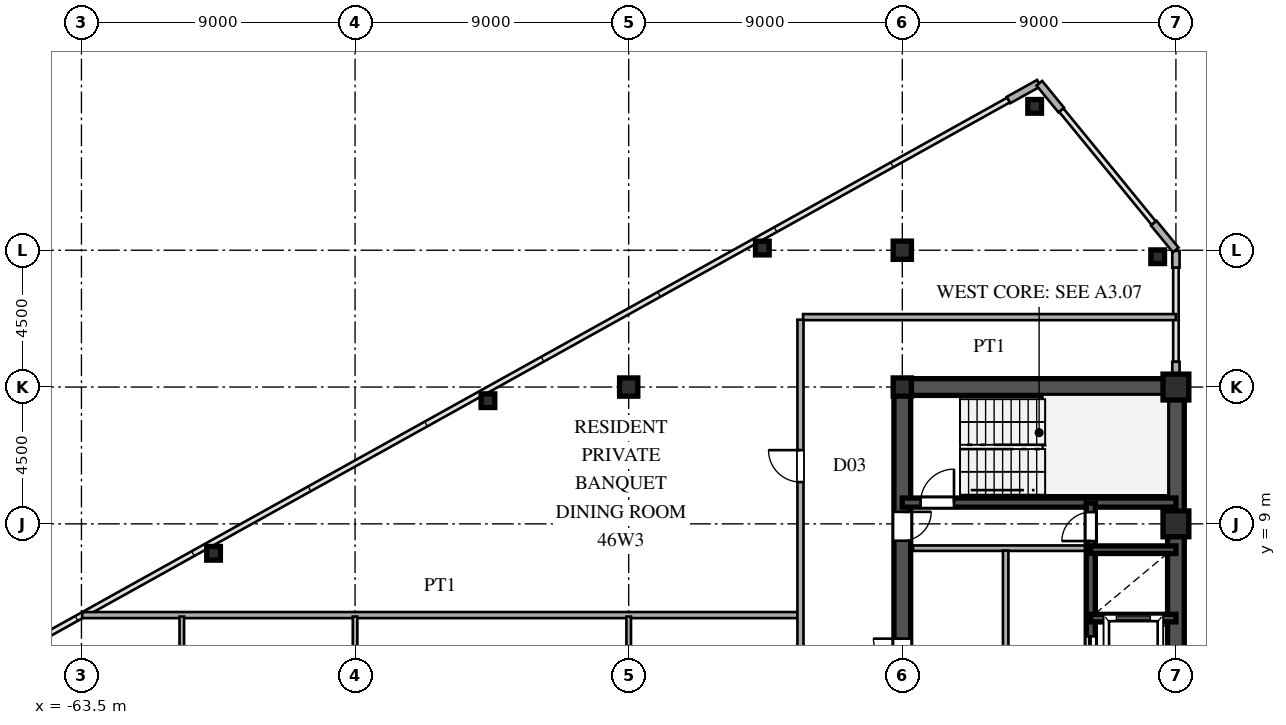
"""IFC4 building model, lengths in metres.
Left out: names, types, materials, properties, quantities, classifications, styles, units other than length and angle.
Written with IfcOpenShell. Run it as: python <this file> out.ifc"""

import sys

from ifc_helpers import new_model, si_unit, direction, frame, frame_2d, origin, origin_2d, place, context, subcontext, project, spatial, rectangle, hollow_rectangle, i_section, extrude, source, transform, mapped, element, fill, save


model = new_model("IFC4")
c1 = context("Model", 3, precision=1e-05, world=origin(), true_north=direction((0.0, 1.0)))
c2 = subcontext(c1, "Body", "Model", "MODEL_VIEW")
j1 = project(units=[si_unit("LENGTHUNIT", "METRE"), si_unit("PLANEANGLEUNIT", "RADIAN")], contexts=[c1])
p1 = place(None, origin())
s1 = spatial("IfcSite", under=j1, at=p1, CompositionType="ELEMENT")
p2 = place(p1, origin())
s2 = spatial("IfcBuilding", under=s1, at=p2, CompositionType="ELEMENT")
p3 = place(p2, frame((0.0, 0.0, 174.3)))
s3 = spatial("IfcBuildingStorey", under=s2, at=p3, CompositionType="ELEMENT", Elevation=174.3)
m1 = source(origin(), c2, "Body", "SweptSolid", [
    extrude(hollow_rectangle(XDim=0.85, YDim=0.85, WallThickness=0.036, at=origin_2d()), origin(), (0.0, 0.0, 1.0), 3.6),
])
for number, where, z_axis, x_axis in (
    (1, (-27.5, 9.0, 0.0), (0.0, 0.0, 1.0), (1.0, 0.0, 0.0)),
    (2, (-27.5, 13.5, 0.0), (0.0, 0.0, 1.0), (1.0, 0.0, 0.0)),
):
    element("IfcColumn", number, at=place(p3, frame(where, z_axis=z_axis, x_axis=x_axis)), inside=s3, PredefinedType="COLUMN", context=c2, shape_type="MappedRepresentation", body=[
        mapped(m1, transform((0.0, 0.0, 0.0), scale=1.0)),
    ])
m2 = source(origin(), c2, "Body", "SweptSolid", [
    extrude(i_section(OverallWidth=0.6, OverallDepth=0.6, WebThickness=0.025, FlangeThickness=0.04, at=origin_2d()), origin(), (0.0, 0.0, 1.0), 3.6),
])
for number, where, z_axis, x_axis in (
    (3, (-36.5, 13.5, 0.0), (0.0, 0.0, 1.0), (1.0, 0.0, 0.0)),
    (4, (-36.5, 18.0, 0.0), (0.0, 0.0, 1.0), (1.0, 0.0, 0.0)),
    (5, (-45.5, 13.5, 0.0), (0.0, 0.0, 1.0), (1.0, 0.0, 0.0)),
):
    element("IfcColumn", number, at=place(p3, frame(where, z_axis=z_axis, x_axis=x_axis)), inside=s3, PredefinedType="COLUMN", context=c2, shape_type="MappedRepresentation", body=[
        mapped(m2, transform((0.0, 0.0, 0.0), scale=1.0)),
    ])
m3 = source(origin(), c2, "Body", "SweptSolid", [
    extrude(hollow_rectangle(XDim=0.45, YDim=0.45, WallThickness=0.018, at=origin_2d()), origin(), (0.0, 0.0, 1.0), 3.6),
])
for number, where, z_axis, x_axis in (
    (6, (-28.1, 17.786, 0.0), (0.0, 0.0, 1.0), (1.0, 0.0, 0.0)),
    (7, (-32.147, 22.732, 0.0), (0.0, 0.0, 1.0), (1.0, 0.0, 0.0)),
    (8, (-41.104, 18.071, 0.0), (0.0, 0.0, 1.0), (1.0, 0.0, 0.0)),
    (9, (-50.129, 13.051, 0.0), (0.0, 0.0, 1.0), (1.0, 0.0, 0.0)),
    (10, (-59.155, 8.031, 0.0), (0.0, 0.0, 1.0), (1.0, 0.0, 0.0)),
):
    element("IfcColumn", number, at=place(p3, frame(where, z_axis=z_axis, x_axis=x_axis)), inside=s3, PredefinedType="COLUMN", context=c2, shape_type="MappedRepresentation", body=[
        mapped(m3, transform((0.0, 0.0, 0.0), scale=1.0)),
    ])
p4 = place(p3, frame((-27.5, 13.78, 0.0), z_axis=(0.0, 0.0, 1.0), x_axis=(0.0, 1.0, 0.0)))
e11 = element("IfcWall", 11, at=p4, inside=s3, PredefinedType="SOLIDWALL", context=c2, shape_type="SweptSolid", body=[
    extrude(rectangle(XDim=0.55, YDim=0.24, at=frame_2d((0.275, 0.0))), origin(), (0.0, 0.0, 1.0), 2.88),
])
p5 = place(p3, frame((-27.5, 17.43, 0.0), z_axis=(0.0, 0.0, 1.0), x_axis=(0.0, 1.0, 0.0)))
e12 = element("IfcWall", 12, at=p5, inside=s3, PredefinedType="SOLIDWALL", context=c2, shape_type="SweptSolid", body=[
    extrude(rectangle(XDim=0.55, YDim=0.24, at=frame_2d((0.275, 0.0))), origin(), (0.0, 0.0, 1.0), 3.38),
])
for number, where, z_axis, x_axis in (
    (13, (-27.506, 18.008, 0.0), (0.0, 0.0, 1.0), (-0.633, 0.774, 0.0)),
    (14, (-31.272, 22.61, 0.0), (0.0, 0.0, 1.0), (-0.633, 0.774, 0.0)),
):
    element("IfcWall", number, at=place(p3, frame(where, z_axis=z_axis, x_axis=x_axis)), inside=s3, PredefinedType="SOLIDWALL", context=c2, shape_type="SweptSolid", body=[
        extrude(rectangle(XDim=1.14, YDim=0.24, at=frame_2d((0.57, 0.0))), origin(), (0.0, 0.0, 1.0), 3.38),
    ])
p6 = place(p3, frame((-32.009, 23.495, 0.0), z_axis=(0.0, 0.0, 1.0), x_axis=(-0.87385402111, -0.486188389196, 0.0)))
e15 = element("IfcWall", 15, at=p6, inside=s3, PredefinedType="SOLIDWALL", context=c2, shape_type="SweptSolid", body=[
    extrude(rectangle(XDim=1.14, YDim=0.24, at=frame_2d((0.57, 0.0))), origin(), (0.0, 0.0, 1.0), 3.38),
])
p7 = place(p3, frame((-27.5, 1.3, 0.0), z_axis=(0.0, 0.0, 1.0), x_axis=(0.0, 1.0, 0.0)))
e16 = element("IfcWall", 16, at=p7, inside=s3, PredefinedType="SHEAR", context=c2, shape_type="SweptSolid", body=[
    extrude(rectangle(XDim=12.2, YDim=0.55, at=frame_2d((6.1, 0.0))), origin(), (0.0, 0.0, 1.0), 3.38),
])
p8 = place(p3, frame((-36.5, 13.5, 0.0), z_axis=(0.0, 0.0, 1.0), x_axis=(1.0, 0.0, 0.0)))
e17 = element("IfcWall", 17, at=p8, inside=s3, PredefinedType="SHEAR", context=c2, shape_type="SweptSolid", body=[
    extrude(rectangle(XDim=9.0, YDim=0.55, at=frame_2d((4.5, 0.0))), origin(), (0.0, 0.0, 1.0), 3.38),
])
p9 = place(p3, frame((-36.5, 8.2, 0.0), z_axis=(0.0, 0.0, 1.0), x_axis=(0.0, 1.0, 0.0)))
e18 = element("IfcWall", 18, at=p9, inside=s3, PredefinedType="SHEAR", context=c2, shape_type="SweptSolid", body=[
    extrude(rectangle(XDim=5.45, YDim=0.55, at=frame_2d((2.725, 0.0))), origin(), (0.0, 0.0, 1.0), 3.38),
])
p10 = place(p9, frame((0.245, 0.0, 0.0)))
e19 = element("IfcOpeningElement", 19, at=p10, cuts=e18, PredefinedType="OPENING", context=c2, shape_type="SweptSolid", body=[
    extrude(rectangle(XDim=0.95, YDim=2.15, at=frame_2d((0.475, 1.075))), frame((0.0, 0.285, 0.0), z_axis=(0.0, -1.0, 0.0), x_axis=(1.0, 0.0, 0.0)), (0.0, 0.0, 1.0), 0.57),
])
p11 = place(p3, frame((-36.5, 1.3, 0.0), z_axis=(0.0, 0.0, 1.0), x_axis=(0.0, 1.0, 0.0)))
e20 = element("IfcWall", 20, at=p11, inside=s3, PredefinedType="SHEAR", context=c2, shape_type="SweptSolid", body=[
    extrude(rectangle(XDim=6.9, YDim=0.55, at=frame_2d((3.45, 0.0))), origin(), (0.0, 0.0, 1.0), 3.38),
])
p12 = place(p11, frame((2.975, 0.0, 0.0)))
e21 = element("IfcOpeningElement", 21, at=p12, cuts=e20, PredefinedType="OPENING", context=c2, shape_type="SweptSolid", body=[
    extrude(rectangle(XDim=0.95, YDim=2.15, at=frame_2d((0.475, 1.075))), frame((0.0, 0.285, 0.0), z_axis=(0.0, -1.0, 0.0), x_axis=(1.0, 0.0, 0.0)), (0.0, 0.0, 1.0), 0.57),
])
p13 = place(p3, frame((-36.5, 9.7, 0.0), z_axis=(0.0, 0.0, 1.0), x_axis=(1.0, 0.0, 0.0)))
e22 = element("IfcWall", 22, at=p13, inside=s3, PredefinedType="SHEAR", context=c2, shape_type="SweptSolid", body=[
    extrude(rectangle(XDim=9.0, YDim=0.3, at=frame_2d((4.5, 0.0))), origin(), (0.0, 0.0, 1.0), 3.38),
])
p14 = place(p13, frame((0.6, 0.0, 0.0)))
e23 = element("IfcOpeningElement", 23, at=p14, cuts=e22, PredefinedType="OPENING", context=c2, shape_type="SweptSolid", body=[
    extrude(rectangle(XDim=1.1, YDim=2.2, at=frame_2d((0.55, 1.1))), frame((0.0, 0.16, 0.0), z_axis=(0.0, -1.0, 0.0), x_axis=(1.0, 0.0, 0.0)), (0.0, 0.0, 1.0), 0.32),
])
for number, where, z_axis, x_axis in (
    (24, (-30.3, 5.9, 0.0), (0.0, 0.0, 1.0), (1.0, 0.0, 0.0)),
    (25, (-30.3, 8.15, 0.0), (0.0, 0.0, 1.0), (1.0, 0.0, 0.0)),
):
    element("IfcWall", number, at=place(p3, frame(where, z_axis=z_axis, x_axis=x_axis)), inside=s3, PredefinedType="SHEAR", context=c2, shape_type="SweptSolid", body=[
        extrude(rectangle(XDim=2.8, YDim=0.25, at=frame_2d((1.4, 0.0))), origin(), (0.0, 0.0, 1.0), 3.38),
    ])
p15 = place(p3, frame((-30.3, 3.6, 0.0), z_axis=(0.0, 0.0, 1.0), x_axis=(0.0, 1.0, 0.0)))
e26 = element("IfcWall", 26, at=p15, inside=s3, PredefinedType="SHEAR", context=c2, shape_type="SweptSolid", body=[
    extrude(rectangle(XDim=2.3, YDim=0.3, at=frame_2d((1.15, 0.0))), origin(), (0.0, 0.0, 1.0), 3.38),
])
p16 = place(p15, frame((0.6, 0.0, 0.0)))
e27 = element("IfcOpeningElement", 27, at=p16, cuts=e26, PredefinedType="OPENING", context=c2, shape_type="SweptSolid", body=[
    extrude(rectangle(XDim=1.1, YDim=2.2, at=frame_2d((0.55, 1.1))), frame((0.0, 0.16, 0.0), z_axis=(0.0, -1.0, 0.0), x_axis=(1.0, 0.0, 0.0)), (0.0, 0.0, 1.0), 0.32),
])
p17 = place(p3, frame((-30.3, 5.9, 0.0), z_axis=(0.0, 0.0, 1.0), x_axis=(0.0, 1.0, 0.0)))
e28 = element("IfcWall", 28, at=p17, inside=s3, PredefinedType="SHEAR", context=c2, shape_type="SweptSolid", body=[
    extrude(rectangle(XDim=2.25, YDim=0.3, at=frame_2d((1.125, 0.0))), origin(), (0.0, 0.0, 1.0), 3.38),
])
p18 = place(p3, frame((-30.3, 8.15, 0.0), z_axis=(0.0, 0.0, 1.0), x_axis=(0.0, 1.0, 0.0)))
e29 = element("IfcWall", 29, at=p18, inside=s3, PredefinedType="SHEAR", context=c2, shape_type="SweptSolid", body=[
    extrude(rectangle(XDim=1.53, YDim=0.3, at=frame_2d((0.765, 0.0))), origin(), (0.0, 0.0, 1.0), 3.38),
])
p19 = place(p18, frame((0.285, 0.0, 0.0)))
e30 = element("IfcOpeningElement", 30, at=p19, cuts=e29, PredefinedType="OPENING", context=c2, shape_type="SweptSolid", body=[
    extrude(rectangle(XDim=0.95, YDim=2.15, at=frame_2d((0.475, 1.075))), frame((0.0, 0.16, 0.0), z_axis=(0.0, -1.0, 0.0), x_axis=(1.0, 0.0, 0.0)), (0.0, 0.0, 1.0), 0.32),
])
p20 = place(p3, frame((-36.15, 8.2, 0.0), z_axis=(0.0, 0.0, 1.0), x_axis=(1.0, 0.0, 0.0)))
e31 = element("IfcWall", 31, at=p20, inside=s3, PredefinedType="PARTITIONING", context=c2, shape_type="SweptSolid", body=[
    extrude(rectangle(XDim=5.7, YDim=0.18, at=frame_2d((2.85, 0.0))), origin(), (0.0, 0.0, 1.0), 3.38),
])
p21 = place(p3, frame((-33.1, 1.38, 0.0), z_axis=(0.0, 0.0, 1.0), x_axis=(0.0, 1.0, 0.0)))
e32 = element("IfcWall", 32, at=p21, inside=s3, PredefinedType="PARTITIONING", context=c2, shape_type="SweptSolid", body=[
    extrude(rectangle(XDim=6.74, YDim=0.18, at=frame_2d((3.37, 0.0))), origin(), (0.0, 0.0, 1.0), 3.38),
])
p22 = place(p3, frame((-63.476, 6.0, 0.0), z_axis=(0.0, 0.0, 1.0), x_axis=(1.0, 0.0, 0.0)))
e33 = element("IfcWall", 33, at=p22, inside=s3, PredefinedType="PARTITIONING", context=c2, shape_type="SweptSolid", body=[
    extrude(rectangle(XDim=23.546, YDim=0.2, at=frame_2d((11.773, 0.0))), origin(), (0.0, 0.0, 1.0), 3.38),
])
p23 = place(p3, frame((-39.765, 15.8, 0.0), z_axis=(0.0, 0.0, 1.0), x_axis=(1.0, 0.0, 0.0)))
e34 = element("IfcWall", 34, at=p23, inside=s3, PredefinedType="PARTITIONING", context=c2, shape_type="SweptSolid", body=[
    extrude(rectangle(XDim=12.265, YDim=0.2, at=frame_2d((6.132, 0.0))), origin(), (0.0, 0.0, 1.0), 3.38),
])
p24 = place(p3, frame((-60.2, -3.283, 0.0), z_axis=(0.0, 0.0, 1.0), x_axis=(0.0, 1.0, 0.0)))
e35 = element("IfcWall", 35, at=p24, inside=s3, PredefinedType="PARTITIONING", context=c2, shape_type="SweptSolid", body=[
    extrude(rectangle(XDim=9.233, YDim=0.15, at=frame_2d((4.616, 0.0))), origin(), (0.0, 0.0, 1.0), 3.38),
])
p25 = place(p24, frame((1.808, 0.0, 0.0)))
e36 = element("IfcOpeningElement", 36, at=p25, cuts=e35, PredefinedType="OPENING", context=c2, shape_type="SweptSolid", body=[
    extrude(rectangle(XDim=0.95, YDim=2.15, at=frame_2d((0.475, 1.075))), frame((0.0, 0.085, 0.0), z_axis=(0.0, -1.0, 0.0), x_axis=(1.0, 0.0, 0.0)), (0.0, 0.0, 1.0), 0.17),
])
p26 = place(p24, frame((6.475, 0.0, 0.0)))
e37 = element("IfcOpeningElement", 37, at=p26, cuts=e35, PredefinedType="OPENING", context=c2, shape_type="SweptSolid", body=[
    extrude(rectangle(XDim=0.95, YDim=2.15, at=frame_2d((0.475, 1.075))), frame((0.0, 0.085, 0.0), z_axis=(0.0, -1.0, 0.0), x_axis=(1.0, 0.0, 0.0)), (0.0, 0.0, 1.0), 0.17),
])
p27 = place(p3, frame((-54.5, -7.95, 0.0), z_axis=(0.0, 0.0, 1.0), x_axis=(0.0, 1.0, 0.0)))
e38 = element("IfcWall", 38, at=p27, inside=s3, PredefinedType="PARTITIONING", context=c2, shape_type="SweptSolid", body=[
    extrude(rectangle(XDim=13.9, YDim=0.15, at=frame_2d((6.95, 0.0))), origin(), (0.0, 0.0, 1.0), 2.78),
])
p28 = place(p27, frame((6.475, 0.0, 0.0)))
e39 = element("IfcOpeningElement", 39, at=p28, cuts=e38, PredefinedType="OPENING", context=c2, shape_type="SweptSolid", body=[
    extrude(rectangle(XDim=0.95, YDim=2.15, at=frame_2d((0.475, 1.075))), frame((0.0, 0.085, 0.0), z_axis=(0.0, -1.0, 0.0), x_axis=(1.0, 0.0, 0.0)), (0.0, 0.0, 1.0), 0.17),
])
p29 = place(p3, frame((-45.5, 1.852, 0.0), z_axis=(0.0, 0.0, 1.0), x_axis=(0.0, 1.0, 0.0)))
e40 = element("IfcWall", 40, at=p29, inside=s3, PredefinedType="PARTITIONING", context=c2, shape_type="SweptSolid", body=[
    extrude(rectangle(XDim=4.098, YDim=0.15, at=frame_2d((2.049, 0.0))), origin(), (0.0, 0.0, 1.0), 2.78),
])
p30 = place(p3, frame((-39.85, -15.715, 0.0), z_axis=(0.0, 0.0, 1.0), x_axis=(0.0, 1.0, 0.0)))
e41 = element("IfcWall", 41, at=p30, inside=s3, PredefinedType="PARTITIONING", context=c2, shape_type="SweptSolid", body=[
    extrude(rectangle(XDim=31.43, YDim=0.2, at=frame_2d((15.715, 0.0))), origin(), (0.0, 0.0, 1.0), 3.38),
])
p31 = place(p30, frame((3.29, 0.0, 0.0)))
e42 = element("IfcOpeningElement", 42, at=p31, cuts=e41, PredefinedType="OPENING", context=c2, shape_type="SweptSolid", body=[
    extrude(rectangle(XDim=1.05, YDim=2.25, at=frame_2d((0.525, 1.125))), frame((0.0, 0.11, 0.0), z_axis=(0.0, -1.0, 0.0), x_axis=(1.0, 0.0, 0.0)), (0.0, 0.0, 1.0), 0.22),
])
p32 = place(p30, frame((13.98, 0.0, 0.0)))
e43 = element("IfcOpeningElement", 43, at=p32, cuts=e41, PredefinedType="OPENING", context=c2, shape_type="SweptSolid", body=[
    extrude(rectangle(XDim=1.05, YDim=2.25, at=frame_2d((0.525, 1.125))), frame((0.0, 0.11, 0.0), z_axis=(0.0, -1.0, 0.0), x_axis=(1.0, 0.0, 0.0)), (0.0, 0.0, 1.0), 0.22),
])
p33 = place(p30, frame((26.09, 0.0, 0.0)))
e44 = element("IfcOpeningElement", 44, at=p33, cuts=e41, PredefinedType="OPENING", context=c2, shape_type="SweptSolid", body=[
    extrude(rectangle(XDim=1.05, YDim=2.25, at=frame_2d((0.525, 1.125))), frame((0.0, 0.11, 0.0), z_axis=(0.0, -1.0, 0.0), x_axis=(1.0, 0.0, 0.0)), (0.0, 0.0, 1.0), 0.22),
])
m4 = source(origin(), c2, "Body", "SweptSolid", [
    extrude(rectangle(XDim=0.95, YDim=2.15, at=frame_2d((0.475, 1.075))), frame((0.0, 0.025, 0.0), z_axis=(0.0, -1.0, 0.0), x_axis=(1.0, 0.0, 0.0)), (0.0, 0.0, 1.0), 0.05),
])
p34 = place(p10, frame((0.95, 0.0, 0.0), z_axis=(0.0, 0.0, 1.0), x_axis=(-1.0, 0.0, 0.0)))
e45 = element("IfcDoor", 45, at=p34, inside=s3, OperationType="SINGLE_SWING_RIGHT", PredefinedType="DOOR", context=c2, shape_type="MappedRepresentation", body=[
    mapped(m4, transform((0.0, 0.0, 0.0), scale=1.0)),
])
fill(e19, e45)
p35 = place(p12, origin())
e46 = element("IfcDoor", 46, at=p35, inside=s3, OperationType="SINGLE_SWING_RIGHT", PredefinedType="DOOR", context=c2, shape_type="MappedRepresentation", body=[
    mapped(m4, transform((0.0, 0.0, 0.0), scale=1.0)),
])
fill(e21, e46)
m5 = source(origin(), c2, "Body", "SweptSolid", [
    extrude(rectangle(XDim=1.1, YDim=2.2, at=frame_2d((0.55, 1.1))), frame((0.0, 0.025, 0.0), z_axis=(0.0, -1.0, 0.0), x_axis=(1.0, 0.0, 0.0)), (0.0, 0.0, 1.0), 0.05),
])
p36 = place(p14, origin())
e47 = element("IfcDoor", 47, at=p36, inside=s3, OperationType="SINGLE_SWING_RIGHT", PredefinedType="DOOR", context=c2, shape_type="MappedRepresentation", body=[
    mapped(m5, transform((0.0, 0.0, 0.0), scale=1.0)),
])
fill(e23, e47)
m6 = source(origin(), c2, "Body", "SweptSolid", [
    extrude(rectangle(XDim=1.1, YDim=2.2, at=frame_2d((0.55, 1.1))), frame((0.0, 0.025, 0.0), z_axis=(0.0, -1.0, 0.0), x_axis=(1.0, 0.0, 0.0)), (0.0, 0.0, 1.0), 0.05),
])
p37 = place(p16, origin())
e48 = element("IfcDoor", 48, at=p37, inside=s3, OperationType="DOUBLE_DOOR_SLIDING", PredefinedType="DOOR", context=c2, shape_type="MappedRepresentation", body=[
    mapped(m6, transform((0.0, 0.0, 0.0), scale=1.0)),
])
fill(e27, e48)
p38 = place(p19, origin())
e49 = element("IfcDoor", 49, at=p38, inside=s3, OperationType="SINGLE_SWING_LEFT", PredefinedType="DOOR", context=c2, shape_type="MappedRepresentation", body=[
    mapped(m4, transform((0.0, 0.0, 0.0), scale=1.0)),
])
fill(e30, e49)
m7 = source(origin(), c2, "Body", "SweptSolid", [
    extrude(rectangle(XDim=1.05, YDim=2.25, at=frame_2d((0.525, 1.125))), frame((0.0, 0.025, 0.0), z_axis=(0.0, -1.0, 0.0), x_axis=(1.0, 0.0, 0.0)), (0.0, 0.0, 1.0), 0.05),
])
p39 = place(p33, origin())
e50 = element("IfcDoor", 50, at=p39, inside=s3, OperationType="SINGLE_SWING_RIGHT", PredefinedType="DOOR", context=c2, shape_type="MappedRepresentation", body=[
    mapped(m7, transform((0.0, 0.0, 0.0), scale=1.0)),
])
fill(e44, e50)
save(model, sys.argv[1])
